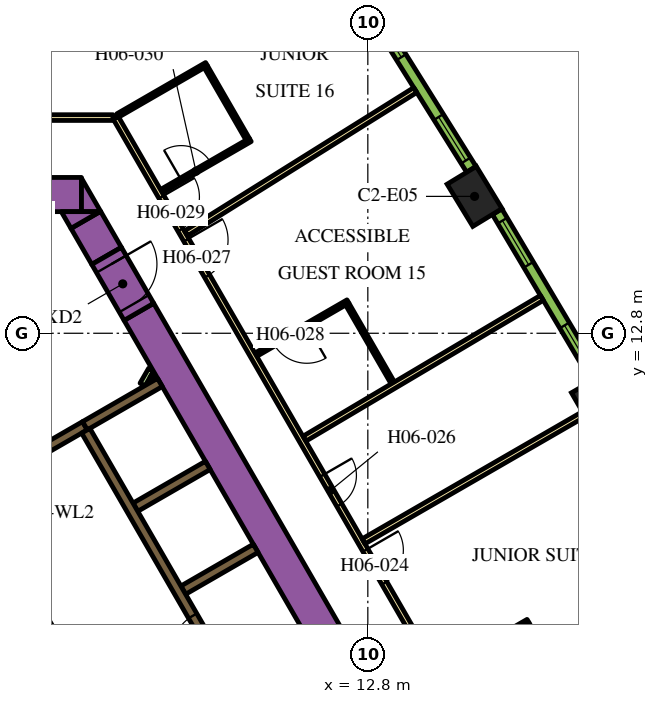
"""IFC4 building model, lengths in metres.
Left out: names, types, materials, properties, quantities, classifications, styles, units other than length and angle.
Written with IfcOpenShell. Run it as: python <this file> out.ifc"""

import sys

from ifc_helpers import new_model, si_unit, direction, frame, frame_2d, origin, origin_2d, place, context, subcontext, project, spatial, polyline, rectangle, outline, extrude, element, fill, save


model = new_model("IFC4")
c1 = context("Model", 3, precision=1e-05, world=origin(), true_north=direction((0.0, 1.0)))
c2 = subcontext(c1, "Body", "Model", "MODEL_VIEW")
j1 = project(units=[si_unit("LENGTHUNIT", "METRE"), si_unit("PLANEANGLEUNIT", "RADIAN")], contexts=[c1])
p1 = place(None, origin())
s1 = spatial("IfcSite", under=j1, at=p1, CompositionType="ELEMENT")
p2 = place(p1, origin())
s2 = spatial("IfcBuilding", under=s1, at=p2, CompositionType="ELEMENT")
p3 = place(p2, frame((0.0, 0.0, 83.7)))
s3 = spatial("IfcBuildingStorey", under=s2, at=p3, CompositionType="ELEMENT", Elevation=83.7)
for number, where, z_axis, x_axis in (
    (1, (18.874, 10.897, 0.0), (0.0, 0.0, 1.0), (-0.5, 0.866, 0.0)),
    (2, (15.609, 16.402, 0.0), (0.0, 0.0, 1.0), (-0.52, 0.854, 0.0)),
):
    element("IfcColumn", number, at=place(p3, frame(where, z_axis=z_axis, x_axis=x_axis)), inside=s3, PredefinedType="COLUMN", context=c2, shape_type="SweptSolid", body=[
        extrude(rectangle(XDim=1.3, YDim=0.9, at=origin_2d()), origin(), (0.0, 0.0, 1.0), 3.9),
    ])
p4 = place(p3, frame((6.776, 13.364, 0.0), z_axis=(0.0, 0.0, 1.0), x_axis=(0.500004177138, -0.8660229921, 0.0)))
e3 = element("IfcWall", 3, at=p4, inside=s3, PredefinedType="SOLIDWALL", context=c2, shape_type="SweptSolid", body=[
    extrude(rectangle(XDim=20.204, YDim=0.9, at=frame_2d((10.102, 0.0))), origin(), (0.0, 0.0, 1.0), 3.9),
])
p5 = place(p3, frame((-4.224, 16.45, 0.0), z_axis=(0.0, 0.0, 1.0), x_axis=(1.0, 0.0, 0.0)))
e4 = element("IfcWall", 4, at=p5, inside=s3, PredefinedType="SOLIDWALL", context=c2, shape_type="SweptSolid", body=[
    extrude(rectangle(XDim=9.488, YDim=0.9, at=frame_2d((4.744, 0.0))), origin(), (0.0, 0.0, 1.0), 3.9),
])
p6 = place(p3, origin())
e5 = element("IfcWall", 5, at=p6, inside=s3, PredefinedType="SOLIDWALL", context=c2, shape_type="SweptSolid", body=[
    extrude(outline(polyline([(5.265, 16.0), (5.265, 16.88), (5.773, 16.0), (5.265, 16.0)])), origin(), (0.0, 0.0, 1.0), 3.9),
])
p7 = place(p3, frame((5.926, 14.836, 0.0), z_axis=(0.0, 0.0, 1.0), x_axis=(-0.500076735116, 0.865981096212, 0.0)))
e6 = element("IfcWall", 6, at=p7, inside=s3, PredefinedType="SOLIDWALL", context=c2, shape_type="SweptSolid", body=[
    extrude(rectangle(XDim=1.094, YDim=0.9, at=frame_2d((0.547, 0.0))), origin(), (0.0, 0.0, 1.0), 3.9),
])
e7 = element("IfcWall", 7, at=p6, inside=s3, PredefinedType="SOLIDWALL", context=c2, shape_type="SweptSolid", body=[
    extrude(outline(polyline([(4.734, 16.0), (5.75, 16.0), (4.988, 15.56), (4.734, 16.0)])), origin(), (0.0, 0.0, 1.0), 3.9),
])
e8 = element("IfcWall", 8, at=p6, inside=s3, PredefinedType="SOLIDWALL", context=c2, shape_type="SweptSolid", body=[
    extrude(outline(polyline([(0.335, 6.925), (0.335, 7.075), (0.335, 7.075), (0.335, 7.075), (0.245, 7.075), (0.079, 7.363), (0.035, 7.439), (0.252, 7.564), (0.377, 7.348), (6.552, -3.348), (6.677, -3.564), (6.46, -3.689), (4.897, -0.981), (0.332, 6.925), (0.335, 6.925), (0.335, 6.925), (0.335, 6.925)])), origin(), (0.0, 0.0, 1.0), 3.9),
])
p8 = place(p3, frame((4.358, 9.791, 0.0), z_axis=(0.0, 0.0, 1.0), x_axis=(0.866079547155, 0.499906209203, 0.0)))
e9 = element("IfcWall", 9, at=p8, inside=s3, PredefinedType="SOLIDWALL", context=c2, shape_type="SweptSolid", body=[
    extrude(rectangle(XDim=1.15, YDim=0.25, at=frame_2d((0.575, 0.0))), origin(), (0.0, 0.0, 1.0), 3.9),
])
p9 = place(p3, frame((5.356, 10.367, 0.0), z_axis=(0.0, 0.0, 1.0), x_axis=(0.865978535641, 0.50008116922, 0.0)))
e10 = element("IfcWall", 10, at=p9, inside=s3, PredefinedType="SOLIDWALL", context=c2, shape_type="SweptSolid", body=[
    extrude(rectangle(XDim=2.278, YDim=0.25, at=frame_2d((1.139, 0.0))), origin(), (0.0, 0.0, 1.0), 3.9),
])
for number, where, z_axis, x_axis in (
    (11, (6.684, 8.224, 0.0), (0.0, 0.0, 1.0), (0.866, 0.5, 0.0)),
    (12, (7.944, 6.041, 0.0), (0.0, 0.0, 1.0), (0.866, 0.5, 0.0)),
):
    element("IfcWall", number, at=place(p3, frame(where, z_axis=z_axis, x_axis=x_axis)), inside=s3, PredefinedType="SOLIDWALL", context=c2, shape_type="SweptSolid", body=[
        extrude(rectangle(XDim=2.2, YDim=0.25, at=frame_2d((1.1, 0.0))), origin(), (0.0, 0.0, 1.0), 3.9),
    ])
p10 = place(p3, frame((6.872, 11.45, 0.0), z_axis=(0.0, 0.0, 1.0), x_axis=(0.499846793097, 0.866113839764, 0.0)))
e13 = element("IfcWall", 13, at=p10, inside=s3, PredefinedType="PARTITIONING", context=c2, shape_type="SweptSolid", body=[
    extrude(rectangle(XDim=0.453, YDim=0.15, at=frame_2d((0.227, 0.0))), origin(), (0.0, 0.0, 1.0), 2.75),
])
p11 = place(p3, frame((7.131, 11.6, 0.0), z_axis=(0.0, 0.0, 1.0), x_axis=(0.498600033135, 0.866832167699, 0.0)))
e14 = element("IfcWall", 14, at=p11, inside=s3, PredefinedType="PARTITIONING", context=c2, shape_type="SweptSolid", body=[
    extrude(rectangle(XDim=0.107, YDim=0.15, at=frame_2d((0.053, 0.0))), origin(), (0.0, 0.0, 1.0), 2.75),
])
p12 = place(p3, frame((11.553, -0.46, 0.0), z_axis=(0.0, 0.0, 1.0), x_axis=(-0.500006514828, 0.866021642414, 0.0)))
e15 = element("IfcWall", 15, at=p12, inside=s3, PredefinedType="SOLIDWALL", context=c2, shape_type="SweptSolid", body=[
    extrude(rectangle(XDim=12.35, YDim=0.25, at=frame_2d((6.175, 0.0))), origin(), (0.0, 0.0, 1.0), 3.9),
])
p13 = place(p12, frame((0.585, 0.0, 0.0)))
e16 = element("IfcOpeningElement", 16, at=p13, cuts=e15, PredefinedType="OPENING", context=c2, shape_type="SweptSolid", body=[
    extrude(rectangle(XDim=1.1, YDim=2.1, at=frame_2d((0.55, 1.05))), frame((0.0, 0.135, 0.0), z_axis=(0.0, -1.0, 0.0), x_axis=(1.0, 0.0, 0.0)), (0.0, 0.0, 1.0), 0.27),
])
p14 = place(p12, frame((3.105, 0.0, 0.0)))
e17 = element("IfcOpeningElement", 17, at=p14, cuts=e15, PredefinedType="OPENING", context=c2, shape_type="SweptSolid", body=[
    extrude(rectangle(XDim=1.1, YDim=2.1, at=frame_2d((0.55, 1.05))), frame((0.0, 0.135, 0.0), z_axis=(0.0, -1.0, 0.0), x_axis=(1.0, 0.0, 0.0)), (0.0, 0.0, 1.0), 0.27),
])
p15 = place(p12, frame((5.625, 0.0, 0.0)))
e18 = element("IfcOpeningElement", 18, at=p15, cuts=e15, PredefinedType="OPENING", context=c2, shape_type="SweptSolid", body=[
    extrude(rectangle(XDim=1.1, YDim=2.1, at=frame_2d((0.55, 1.05))), frame((0.0, 0.135, 0.0), z_axis=(0.0, -1.0, 0.0), x_axis=(1.0, 0.0, 0.0)), (0.0, 0.0, 1.0), 0.27),
])
p16 = place(p3, frame((8.565, -2.185, 0.0), z_axis=(0.0, 0.0, 1.0), x_axis=(-0.499997954832, 0.866026584559, 0.0)))
e19 = element("IfcWall", 19, at=p16, inside=s3, PredefinedType="SOLIDWALL", context=c2, shape_type="SweptSolid", body=[
    extrude(rectangle(XDim=12.35, YDim=0.25, at=frame_2d((6.175, 0.0))), origin(), (0.0, 0.0, 1.0), 3.9),
])
p17 = place(p16, frame((5.725, 0.0, 0.0)))
e20 = element("IfcOpeningElement", 20, at=p17, cuts=e19, PredefinedType="OPENING", context=c2, shape_type="SweptSolid", body=[
    extrude(rectangle(XDim=0.9, YDim=2.1, at=frame_2d((0.45, 1.05))), frame((0.0, 0.135, 0.0), z_axis=(0.0, -1.0, 0.0), x_axis=(1.0, 0.0, 0.0)), (0.0, 0.0, 1.0), 0.27),
])
p18 = place(p3, frame((5.926, 14.836, 0.0), z_axis=(0.0, 0.0, 1.0), x_axis=(0.500062241894, -0.865989465428, 0.0)))
e21 = element("IfcWall", 21, at=p18, inside=s3, PredefinedType="SOLIDWALL", context=c2, shape_type="SweptSolid", body=[
    extrude(rectangle(XDim=1.7, YDim=0.9, at=frame_2d((0.85, 0.0))), origin(), (0.0, 0.0, 1.0), 3.9),
])
p19 = place(p18, frame((0.25, 0.0, 0.0)))
e22 = element("IfcOpeningElement", 22, at=p19, cuts=e21, PredefinedType="OPENING", context=c2, shape_type="SweptSolid", body=[
    extrude(rectangle(XDim=1.2, YDim=2.1, at=frame_2d((0.6, 1.05))), frame((0.0, 0.46, 0.0), z_axis=(0.0, -1.0, 0.0), x_axis=(1.0, 0.0, 0.0)), (0.0, 0.0, 1.0), 0.92),
])
p20 = place(p3, frame((6.163, 18.475, 0.0), z_axis=(0.0, 0.0, 1.0), x_axis=(0.500001317485, -0.866024643133, 0.0)))
e23 = element("IfcWall", 23, at=p20, inside=s3, PredefinedType="PARTITIONING", context=c2, shape_type="SweptSolid", body=[
    extrude(rectangle(XDim=25.767, YDim=0.15, at=frame_2d((12.883, 0.0))), origin(), (0.0, 0.0, 1.0), 2.75),
])
p21 = place(p20, frame((24.241, 0.0, 0.0)))
e24 = element("IfcOpeningElement", 24, at=p21, cuts=e23, PredefinedType="OPENING", context=c2, shape_type="SweptSolid", body=[
    extrude(rectangle(XDim=1.0, YDim=2.1, at=frame_2d((0.5, 1.05))), frame((0.0, 0.085, 0.0), z_axis=(0.0, -1.0, 0.0), x_axis=(1.0, 0.0, 0.0)), (0.0, 0.0, 1.0), 0.17),
])
p22 = place(p20, frame((13.144, 0.0, 0.0)))
e25 = element("IfcOpeningElement", 25, at=p22, cuts=e23, PredefinedType="OPENING", context=c2, shape_type="SweptSolid", body=[
    extrude(rectangle(XDim=1.0, YDim=2.1, at=frame_2d((0.5, 1.05))), frame((0.0, 0.085, 0.0), z_axis=(0.0, -1.0, 0.0), x_axis=(1.0, 0.0, 0.0)), (0.0, 0.0, 1.0), 0.17),
])
p23 = place(p20, frame((10.874, 0.0, 0.0)))
e26 = element("IfcOpeningElement", 26, at=p23, cuts=e23, PredefinedType="OPENING", context=c2, shape_type="SweptSolid", body=[
    extrude(rectangle(XDim=0.9, YDim=2.1, at=frame_2d((0.45, 1.05))), frame((0.0, 0.085, 0.0), z_axis=(0.0, -1.0, 0.0), x_axis=(1.0, 0.0, 0.0)), (0.0, 0.0, 1.0), 0.17),
])
p24 = place(p20, frame((3.718, 0.0, 0.0)))
e27 = element("IfcOpeningElement", 27, at=p24, cuts=e23, PredefinedType="OPENING", context=c2, shape_type="SweptSolid", body=[
    extrude(rectangle(XDim=1.1, YDim=2.1, at=frame_2d((0.55, 1.05))), frame((0.0, 0.085, 0.0), z_axis=(0.0, -1.0, 0.0), x_axis=(1.0, 0.0, 0.0)), (0.0, 0.0, 1.0), 0.17),
])
p25 = place(p20, frame((2.411, 0.0, 0.0)))
e28 = element("IfcOpeningElement", 28, at=p25, cuts=e23, PredefinedType="OPENING", context=c2, shape_type="SweptSolid", body=[
    extrude(rectangle(XDim=1.0, YDim=2.1, at=frame_2d((0.5, 1.05))), frame((0.0, 0.085, 0.0), z_axis=(0.0, -1.0, 0.0), x_axis=(1.0, 0.0, 0.0)), (0.0, 0.0, 1.0), 0.17),
])
p26 = place(p3, frame((0.825, 18.475, 0.0), z_axis=(0.0, 0.0, 1.0), x_axis=(1.0, 0.0, 0.0)))
e29 = element("IfcWall", 29, at=p26, inside=s3, PredefinedType="PARTITIONING", context=c2, shape_type="SweptSolid", body=[
    extrude(rectangle(XDim=5.268, YDim=0.15, at=frame_2d((2.634, 0.0))), origin(), (0.0, 0.0, 1.0), 2.75),
])
p27 = place(p3, frame((10.592, 24.589, 0.0), z_axis=(0.0, 0.0, 1.0), x_axis=(-0.835337323748, -0.549737715236, 0.0)))
e30 = element("IfcWall", 30, at=p27, inside=s3, PredefinedType="PARTITIONING", context=c2, shape_type="SweptSolid", body=[
    extrude(rectangle(XDim=10.875, YDim=0.15, at=frame_2d((5.438, 0.0))), origin(), (0.0, 0.0, 1.0), 2.75),
])
p28 = place(p3, frame((14.049, 19.2, 0.0), z_axis=(0.0, 0.0, 1.0), x_axis=(-0.847955867271, -0.530066832731, 0.0)))
e31 = element("IfcWall", 31, at=p28, inside=s3, PredefinedType="PARTITIONING", context=c2, shape_type="SweptSolid", body=[
    extrude(rectangle(XDim=7.111, YDim=0.15, at=frame_2d((3.556, 0.0))), origin(), (0.0, 0.0, 1.0), 2.75),
])
p29 = place(p3, frame((17.379, 13.731, 0.0), z_axis=(0.0, 0.0, 1.0), x_axis=(-0.860132461691, -0.510070728768, 0.0)))
e32 = element("IfcWall", 32, at=p29, inside=s3, PredefinedType="PARTITIONING", context=c2, shape_type="SweptSolid", body=[
    extrude(rectangle(XDim=7.257, YDim=0.15, at=frame_2d((3.628, 0.0))), origin(), (0.0, 0.0, 1.0), 2.75),
])
p30 = place(p3, frame((18.484, 10.672, 0.0), z_axis=(0.0, 0.0, 1.0), x_axis=(-0.866019162053, -0.50001081084, 0.0)))
e33 = element("IfcWall", 33, at=p30, inside=s3, PredefinedType="PARTITIONING", context=c2, shape_type="SweptSolid", body=[
    extrude(rectangle(XDim=6.694, YDim=0.15, at=frame_2d((3.347, 0.0))), origin(), (0.0, 0.0, 1.0), 2.75),
])
p31 = place(p3, frame((21.614, 5.102, 0.0), z_axis=(0.0, 0.0, 1.0), x_axis=(-0.877484555087, -0.479604895287, 0.0)))
e34 = element("IfcWall", 34, at=p31, inside=s3, PredefinedType="PARTITIONING", context=c2, shape_type="SweptSolid", body=[
    extrude(rectangle(XDim=6.611, YDim=0.15, at=frame_2d((3.306, 0.0))), origin(), (0.0, 0.0, 1.0), 2.75),
])
p32 = place(p3, frame((17.016, 5.228, 0.0), z_axis=(0.0, 0.0, 1.0), x_axis=(-0.86599734893, -0.500048589285, 0.0)))
e35 = element("IfcWall", 35, at=p32, inside=s3, PredefinedType="PARTITIONING", context=c2, shape_type="SweptSolid", body=[
    extrude(rectangle(XDim=2.7, YDim=0.1, at=frame_2d((1.35, 0.0))), origin(), (0.0, 0.0, 1.0), 2.75),
])
p33 = place(p32, frame((1.2, 0.0, 0.0)))
e36 = element("IfcOpeningElement", 36, at=p33, cuts=e35, PredefinedType="OPENING", context=c2, shape_type="SweptSolid", body=[
    extrude(rectangle(XDim=0.9, YDim=2.1, at=frame_2d((0.45, 1.05))), frame((0.0, 0.06, 0.0), z_axis=(0.0, -1.0, 0.0), x_axis=(1.0, 0.0, 0.0)), (0.0, 0.0, 1.0), 0.12),
])
p34 = place(p3, frame((16.997, 5.16, 0.0), z_axis=(0.0, 0.0, 1.0), x_axis=(0.500011965869, -0.866018495177, 0.0)))
e37 = element("IfcWall", 37, at=p34, inside=s3, PredefinedType="PARTITIONING", context=c2, shape_type="SweptSolid", body=[
    extrude(rectangle(XDim=2.19, YDim=0.1, at=frame_2d((1.095, 0.0))), origin(), (0.0, 0.0, 1.0), 2.75),
])
p35 = place(p3, frame((12.277, 13.635, 0.0), z_axis=(0.0, 0.0, 1.0), x_axis=(-0.866034573852, -0.49998411664, 0.0)))
e38 = element("IfcWall", 38, at=p35, inside=s3, PredefinedType="PARTITIONING", context=c2, shape_type="SweptSolid", body=[
    extrude(rectangle(XDim=2.8, YDim=0.1, at=frame_2d((1.4, 0.0))), origin(), (0.0, 0.0, 1.0), 2.75),
])
p36 = place(p35, frame((1.25, 0.0, 0.0)))
e39 = element("IfcOpeningElement", 39, at=p36, cuts=e38, PredefinedType="OPENING", context=c2, shape_type="SweptSolid", body=[
    extrude(rectangle(XDim=1.0, YDim=2.1, at=frame_2d((0.5, 1.05))), frame((0.0, 0.06, 0.0), z_axis=(0.0, -1.0, 0.0), x_axis=(1.0, 0.0, 0.0)), (0.0, 0.0, 1.0), 0.12),
])
p37 = place(p3, frame((12.259, 13.567, 0.0), z_axis=(0.0, 0.0, 1.0), x_axis=(0.500017192868, -0.86601547725, 0.0)))
e40 = element("IfcWall", 40, at=p37, inside=s3, PredefinedType="PARTITIONING", context=c2, shape_type="SweptSolid", body=[
    extrude(rectangle(XDim=2.39, YDim=0.1, at=frame_2d((1.195, 0.0))), origin(), (0.0, 0.0, 1.0), 2.75),
])
p38 = place(p3, frame((7.368, 16.538, 0.0), z_axis=(0.0, 0.0, 1.0), x_axis=(0.866036505625, 0.499980770555, 0.0)))
e41 = element("IfcWall", 41, at=p38, inside=s3, PredefinedType="PARTITIONING", context=c2, shape_type="SweptSolid", body=[
    extrude(rectangle(XDim=2.7, YDim=0.1, at=frame_2d((1.35, 0.0))), origin(), (0.0, 0.0, 1.0), 2.75),
])
p39 = place(p38, frame((0.6, 0.0, 0.0)))
e42 = element("IfcOpeningElement", 42, at=p39, cuts=e41, PredefinedType="OPENING", context=c2, shape_type="SweptSolid", body=[
    extrude(rectangle(XDim=0.9, YDim=2.1, at=frame_2d((0.45, 1.05))), frame((0.0, 0.06, 0.0), z_axis=(0.0, -1.0, 0.0), x_axis=(1.0, 0.0, 0.0)), (0.0, 0.0, 1.0), 0.12),
])
p40 = place(p3, frame((9.638, 17.906, 0.0), z_axis=(0.0, 0.0, 1.0), x_axis=(-0.50002983664, 0.866008176907, 0.0)))
e43 = element("IfcWall", 43, at=p40, inside=s3, PredefinedType="PARTITIONING", context=c2, shape_type="SweptSolid", body=[
    extrude(rectangle(XDim=2.2, YDim=0.1, at=frame_2d((1.1, 0.0))), origin(), (0.0, 0.0, 1.0), 2.75),
])
p41 = place(p3, frame((6.218, 18.53, 0.0), z_axis=(0.0, 0.0, 1.0), x_axis=(0.86599734893, 0.500048589285, 0.0)))
e44 = element("IfcWall", 44, at=p41, inside=s3, PredefinedType="PARTITIONING", context=c2, shape_type="SweptSolid", body=[
    extrude(rectangle(XDim=2.7, YDim=0.1, at=frame_2d((1.35, 0.0))), origin(), (0.0, 0.0, 1.0), 2.75),
])
p42 = place(p3, frame((18.805, 11.611, 0.0), z_axis=(0.0, 0.0, 1.0), x_axis=(-0.510054281659, 0.860142214847, 0.0)))
e45 = element("IfcWall", 45, at=p42, inside=s3, PredefinedType="SOLIDWALL", context=c2, shape_type="SweptSolid", body=[
    extrude(rectangle(XDim=5.101, YDim=0.29, at=frame_2d((2.55, 0.0))), origin(), (0.0, 0.0, 1.0), 3.65),
])
p43 = place(p42, frame((0.273, 0.0, 0.9)))
e46 = element("IfcOpeningElement", 46, at=p43, cuts=e45, PredefinedType="OPENING", context=c2, shape_type="SweptSolid", body=[
    extrude(rectangle(XDim=1.35, YDim=2.15, at=frame_2d((0.675, 1.075))), frame((0.0, 0.155, 0.0), z_axis=(0.0, -1.0, 0.0), x_axis=(1.0, 0.0, 0.0)), (0.0, 0.0, 1.0), 0.31),
])
p44 = place(p42, frame((3.478, 0.0, 0.9)))
e47 = element("IfcOpeningElement", 47, at=p44, cuts=e45, PredefinedType="OPENING", context=c2, shape_type="SweptSolid", body=[
    extrude(rectangle(XDim=1.35, YDim=2.15, at=frame_2d((0.675, 1.075))), frame((0.0, 0.155, 0.0), z_axis=(0.0, -1.0, 0.0), x_axis=(1.0, 0.0, 0.0)), (0.0, 0.0, 1.0), 0.31),
])
p45 = place(p3, frame((15.524, 17.114, 0.0), z_axis=(0.0, 0.0, 1.0), x_axis=(-0.530072082134, 0.847952585787, 0.0)))
e48 = element("IfcWall", 48, at=p45, inside=s3, PredefinedType="SOLIDWALL", context=c2, shape_type="SweptSolid", body=[
    extrude(rectangle(XDim=5.1, YDim=0.29, at=frame_2d((2.55, 0.0))), origin(), (0.0, 0.0, 1.0), 3.65),
])
p46 = place(p45, frame((0.273, 0.0, 0.9)))
e49 = element("IfcOpeningElement", 49, at=p46, cuts=e48, PredefinedType="OPENING", context=c2, shape_type="SweptSolid", body=[
    extrude(rectangle(XDim=1.35, YDim=2.15, at=frame_2d((0.675, 1.075))), frame((0.0, 0.155, 0.0), z_axis=(0.0, -1.0, 0.0), x_axis=(1.0, 0.0, 0.0)), (0.0, 0.0, 1.0), 0.31),
])
p47 = place(p45, frame((3.478, 0.0, 0.9)))
e50 = element("IfcOpeningElement", 50, at=p47, cuts=e48, PredefinedType="OPENING", context=c2, shape_type="SweptSolid", body=[
    extrude(rectangle(XDim=1.35, YDim=2.15, at=frame_2d((0.675, 1.075))), frame((0.0, 0.155, 0.0), z_axis=(0.0, -1.0, 0.0), x_axis=(1.0, 0.0, 0.0)), (0.0, 0.0, 1.0), 0.31),
])
p48 = place(p15, origin())
e51 = element("IfcDoor", 51, at=p48, inside=s3, OperationType="DOUBLE_DOOR_SLIDING", PredefinedType="DOOR", context=c2, shape_type="SweptSolid", body=[
    extrude(rectangle(XDim=1.1, YDim=2.1, at=frame_2d((0.55, 1.05))), frame((0.0, 0.025, 0.0), z_axis=(0.0, -1.0, 0.0), x_axis=(1.0, 0.0, 0.0)), (0.0, 0.0, 1.0), 0.05),
])
fill(e18, e51)
p49 = place(p19, origin())
e52 = element("IfcDoor", 52, at=p49, inside=s3, OperationType="SINGLE_SWING_LEFT", PredefinedType="DOOR", context=c2, shape_type="SweptSolid", body=[
    extrude(rectangle(XDim=1.2, YDim=2.1, at=frame_2d((0.6, 1.05))), frame((0.0, 0.025, 0.0), z_axis=(0.0, -1.0, 0.0), x_axis=(1.0, 0.0, 0.0)), (0.0, 0.0, 1.0), 0.05),
])
fill(e22, e52)
p50 = place(p22, origin())
e53 = element("IfcDoor", 53, at=p50, inside=s3, OperationType="SINGLE_SWING_LEFT", PredefinedType="DOOR", context=c2, shape_type="SweptSolid", body=[
    extrude(rectangle(XDim=1.0, YDim=2.1, at=frame_2d((0.5, 1.05))), frame((0.0, 0.025, 0.0), z_axis=(0.0, -1.0, 0.0), x_axis=(1.0, 0.0, 0.0)), (0.0, 0.0, 1.0), 0.05),
])
fill(e25, e53)
p51 = place(p23, origin())
e54 = element("IfcDoor", 54, at=p51, inside=s3, OperationType="SINGLE_SWING_RIGHT", PredefinedType="DOOR", context=c2, shape_type="SweptSolid", body=[
    extrude(rectangle(XDim=0.9, YDim=2.1, at=frame_2d((0.45, 1.05))), frame((0.0, 0.025, 0.0), z_axis=(0.0, -1.0, 0.0), x_axis=(1.0, 0.0, 0.0)), (0.0, 0.0, 1.0), 0.05),
])
fill(e26, e54)
p52 = place(p24, origin())
e55 = element("IfcDoor", 55, at=p52, inside=s3, OperationType="SINGLE_SWING_LEFT", PredefinedType="DOOR", context=c2, shape_type="SweptSolid", body=[
    extrude(rectangle(XDim=1.1, YDim=2.1, at=frame_2d((0.55, 1.05))), frame((0.0, 0.025, 0.0), z_axis=(0.0, -1.0, 0.0), x_axis=(1.0, 0.0, 0.0)), (0.0, 0.0, 1.0), 0.05),
])
fill(e27, e55)
p53 = place(p36, origin())
e56 = element("IfcDoor", 56, at=p53, inside=s3, OperationType="SINGLE_SWING_RIGHT", PredefinedType="DOOR", context=c2, shape_type="SweptSolid", body=[
    extrude(rectangle(XDim=1.0, YDim=2.1, at=frame_2d((0.5, 1.05))), frame((0.0, 0.025, 0.0), z_axis=(0.0, -1.0, 0.0), x_axis=(1.0, 0.0, 0.0)), (0.0, 0.0, 1.0), 0.05),
])
fill(e39, e56)
p54 = place(p25, origin())
e57 = element("IfcDoor", 57, at=p54, inside=s3, OperationType="SINGLE_SWING_RIGHT", PredefinedType="DOOR", context=c2, shape_type="SweptSolid", body=[
    extrude(rectangle(XDim=1.0, YDim=2.1, at=frame_2d((0.5, 1.05))), frame((0.0, 0.025, 0.0), z_axis=(0.0, -1.0, 0.0), x_axis=(1.0, 0.0, 0.0)), (0.0, 0.0, 1.0), 0.05),
])
fill(e28, e57)
p55 = place(p39, origin())
e58 = element("IfcDoor", 58, at=p55, inside=s3, OperationType="SINGLE_SWING_LEFT", PredefinedType="DOOR", context=c2, shape_type="SweptSolid", body=[
    extrude(rectangle(XDim=0.9, YDim=2.1, at=frame_2d((0.45, 1.05))), frame((0.0, 0.025, 0.0), z_axis=(0.0, -1.0, 0.0), x_axis=(1.0, 0.0, 0.0)), (0.0, 0.0, 1.0), 0.05),
])
fill(e42, e58)
p56 = place(p43, origin())
e59 = element("IfcWindow", 59, at=p56, inside=s3, PartitioningType="DOUBLE_PANEL_VERTICAL", PredefinedType="WINDOW", context=c2, shape_type="SweptSolid", body=[
    extrude(rectangle(XDim=1.35, YDim=2.15, at=frame_2d((0.675, 1.075))), frame((0.0, 0.015, 0.0), z_axis=(0.0, -1.0, 0.0), x_axis=(1.0, 0.0, 0.0)), (0.0, 0.0, 1.0), 0.06),
])
fill(e46, e59)
p57 = place(p44, origin())
e60 = element("IfcWindow", 60, at=p57, inside=s3, PartitioningType="DOUBLE_PANEL_VERTICAL", PredefinedType="WINDOW", context=c2, shape_type="SweptSolid", body=[
    extrude(rectangle(XDim=1.35, YDim=2.15, at=frame_2d((0.675, 1.075))), frame((0.0, 0.015, 0.0), z_axis=(0.0, -1.0, 0.0), x_axis=(1.0, 0.0, 0.0)), (0.0, 0.0, 1.0), 0.06),
])
fill(e47, e60)
p58 = place(p46, origin())
e61 = element("IfcWindow", 61, at=p58, inside=s3, PartitioningType="DOUBLE_PANEL_VERTICAL", PredefinedType="WINDOW", context=c2, shape_type="SweptSolid", body=[
    extrude(rectangle(XDim=1.35, YDim=2.15, at=frame_2d((0.675, 1.075))), frame((0.0, 0.015, 0.0), z_axis=(0.0, -1.0, 0.0), x_axis=(1.0, 0.0, 0.0)), (0.0, 0.0, 1.0), 0.06),
])
fill(e49, e61)
p59 = place(p47, origin())
e62 = element("IfcWindow", 62, at=p59, inside=s3, PartitioningType="DOUBLE_PANEL_VERTICAL", PredefinedType="WINDOW", context=c2, shape_type="SweptSolid", body=[
    extrude(rectangle(XDim=1.35, YDim=2.15, at=frame_2d((0.675, 1.075))), frame((0.0, 0.015, 0.0), z_axis=(0.0, -1.0, 0.0), x_axis=(1.0, 0.0, 0.0)), (0.0, 0.0, 1.0), 0.06),
])
fill(e50, e62)
save(model, sys.argv[1])
